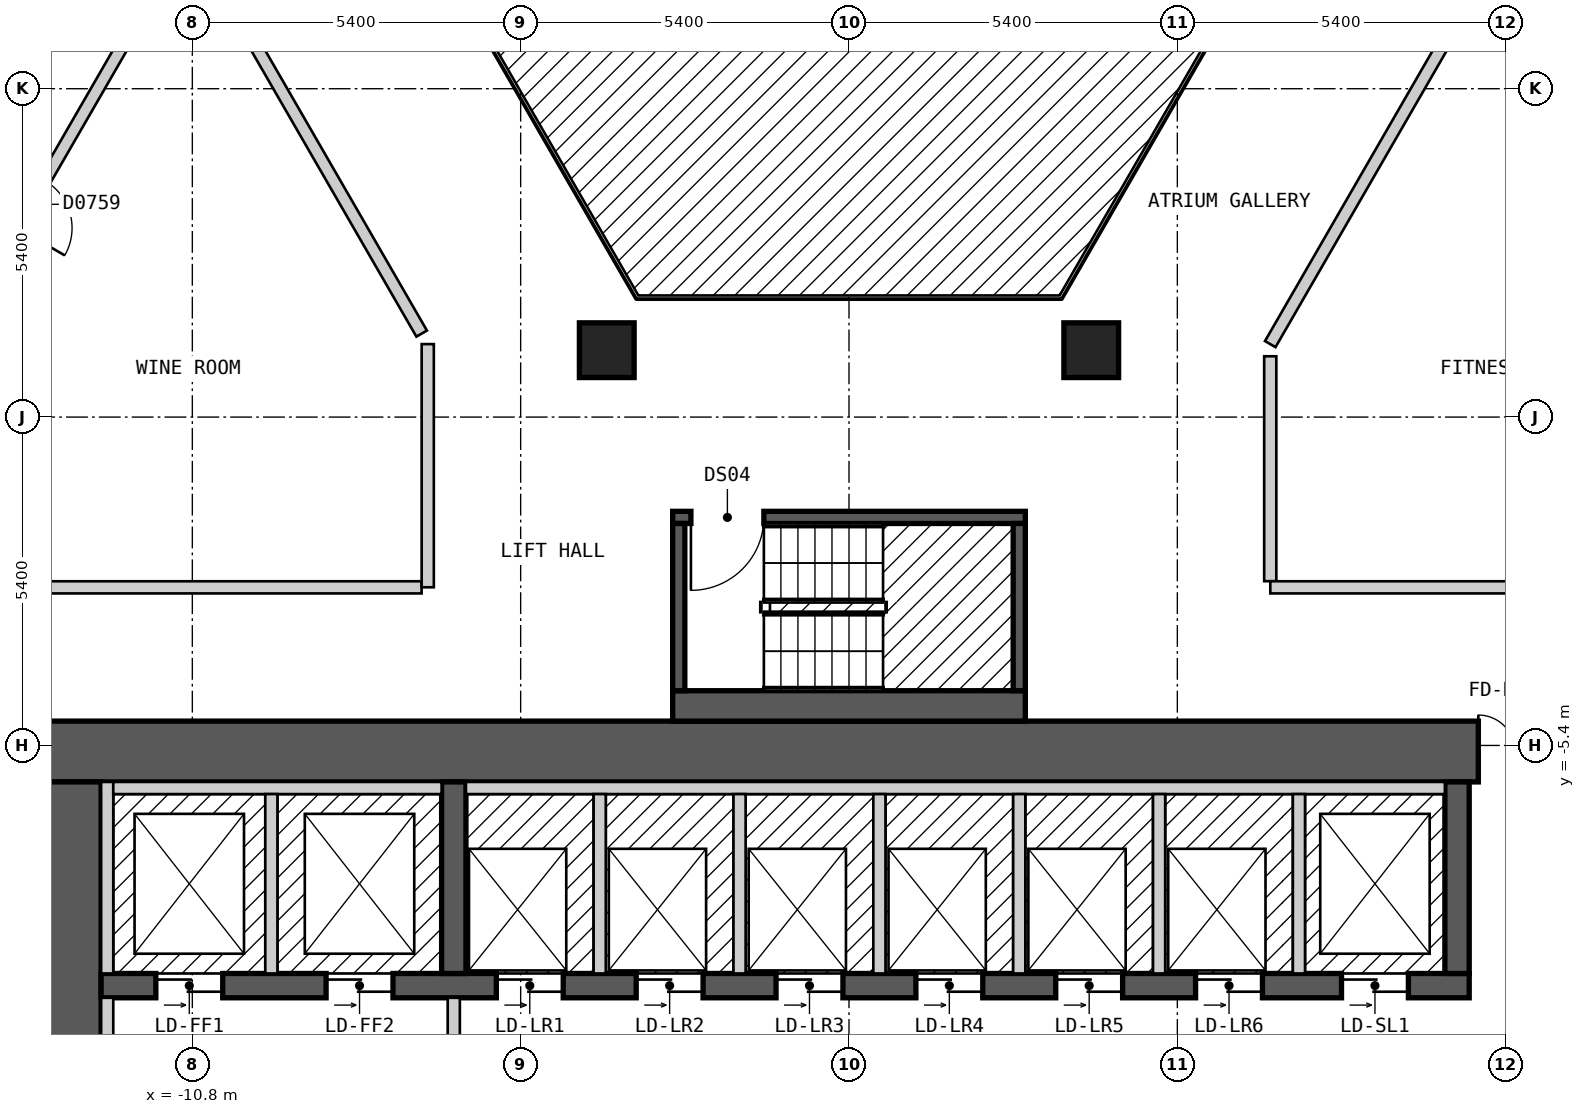
"""IFC4 building model, lengths in metres.
Left out: names, types, materials, properties, quantities, classifications, styles, units other than length and angle.
Written with IfcOpenShell. Run it as: python <this file> out.ifc"""

import sys

from ifc_helpers import new_model, si_unit, direction, frame, frame_2d, origin, origin_2d, place, context, subcontext, project, spatial, rectangle, extrude, element, fill, save


model = new_model("IFC4")
c1 = context("Model", 3, precision=1e-05, world=origin(), true_north=direction((0.0, 1.0)))
c2 = subcontext(c1, "Body", "Model", "MODEL_VIEW")
j1 = project(units=[si_unit("LENGTHUNIT", "METRE"), si_unit("PLANEANGLEUNIT", "RADIAN")], contexts=[c1])
p1 = place(None, origin())
s1 = spatial("IfcSite", under=j1, at=p1, CompositionType="ELEMENT")
p2 = place(p1, origin())
s2 = spatial("IfcBuilding", under=s1, at=p2, CompositionType="ELEMENT")
p3 = place(p2, frame((0.0, 0.0, 93.0)))
s3 = spatial("IfcBuildingStorey", under=s2, at=p3, CompositionType="ELEMENT", Elevation=93.0)
for number, where, z_axis, x_axis in (
    (1, (3.984, 1.1, 0.0), (0.0, 0.0, 1.0), (1.0, 0.0, 0.0)),
    (2, (-3.984, 1.1, 0.0), (0.0, 0.0, 1.0), (1.0, 0.0, 0.0)),
):
    element("IfcColumn", number, at=place(p3, frame(where, z_axis=z_axis, x_axis=x_axis)), inside=s3, PredefinedType="COLUMN", context=c2, shape_type="SweptSolid", body=[
        extrude(rectangle(XDim=0.9, YDim=0.9, at=origin_2d()), origin(), (0.0, 0.0, 1.0), 3.0),
    ])
p4 = place(p3, frame((-13.3, -5.5, 0.0), z_axis=(0.0, 0.0, 1.0), x_axis=(1.0, 0.0, 0.0)))
e3 = element("IfcWall", 3, at=p4, inside=s3, PredefinedType="SHEAR", context=c2, shape_type="SweptSolid", body=[
    extrude(rectangle(XDim=26.6, YDim=1.0, at=frame_2d((13.3, 0.0))), origin(), (0.0, 0.0, 1.0), 2.7),
])
p5 = place(p4, frame((23.65, 0.0, 0.0)))
e4 = element("IfcOpeningElement", 4, at=p5, cuts=e3, PredefinedType="OPENING", context=c2, shape_type="SweptSolid", body=[
    extrude(rectangle(XDim=1.2, YDim=2.1, at=frame_2d((0.6, 1.05))), frame((0.0, 0.51, 0.0), z_axis=(0.0, -1.0, 0.0), x_axis=(1.0, 0.0, 0.0)), (0.0, 0.0, 1.0), 1.02),
])
p6 = place(p3, frame((-12.8, -18.0, 0.0), z_axis=(0.0, 0.0, 1.0), x_axis=(0.0, 1.0, 0.0)))
e5 = element("IfcWall", 5, at=p6, inside=s3, PredefinedType="SHEAR", context=c2, shape_type="SweptSolid", body=[
    extrude(rectangle(XDim=12.0, YDim=1.0, at=frame_2d((6.0, 0.0))), origin(), (0.0, 0.0, 1.0), 2.7),
])
p7 = place(p6, frame((3.8, 0.0, 0.0)))
e6 = element("IfcOpeningElement", 6, at=p7, cuts=e5, PredefinedType="OPENING", context=c2, shape_type="SweptSolid", body=[
    extrude(rectangle(XDim=1.2, YDim=2.1, at=frame_2d((0.6, 1.05))), frame((0.0, 0.51, 0.0), z_axis=(0.0, -1.0, 0.0), x_axis=(1.0, 0.0, 0.0)), (0.0, 0.0, 1.0), 1.02),
])
p8 = place(p3, frame((-12.3, -9.35, 0.0), z_axis=(0.0, 0.0, 1.0), x_axis=(1.0, 0.0, 0.0)))
e7 = element("IfcWall", 7, at=p8, inside=s3, PredefinedType="SHEAR", context=c2, shape_type="SweptSolid", body=[
    extrude(rectangle(XDim=22.5, YDim=0.4, at=frame_2d((11.25, 0.0))), origin(), (0.0, 0.0, 1.0), 2.7),
])
p9 = place(p8, frame((0.9, 0.0, 0.0)))
e8 = element("IfcOpeningElement", 8, at=p9, cuts=e7, PredefinedType="OPENING", context=c2, shape_type="SweptSolid", body=[
    extrude(rectangle(XDim=1.1, YDim=2.1, at=frame_2d((0.55, 1.05))), frame((0.0, 0.21, 0.0), z_axis=(0.0, -1.0, 0.0), x_axis=(1.0, 0.0, 0.0)), (0.0, 0.0, 1.0), 0.42),
])
p10 = place(p8, frame((3.7, 0.0, 0.0)))
e9 = element("IfcOpeningElement", 9, at=p10, cuts=e7, PredefinedType="OPENING", context=c2, shape_type="SweptSolid", body=[
    extrude(rectangle(XDim=1.1, YDim=2.1, at=frame_2d((0.55, 1.05))), frame((0.0, 0.21, 0.0), z_axis=(0.0, -1.0, 0.0), x_axis=(1.0, 0.0, 0.0)), (0.0, 0.0, 1.0), 0.42),
])
p11 = place(p8, frame((6.5, 0.0, 0.0)))
e10 = element("IfcOpeningElement", 10, at=p11, cuts=e7, PredefinedType="OPENING", context=c2, shape_type="SweptSolid", body=[
    extrude(rectangle(XDim=1.1, YDim=2.1, at=frame_2d((0.55, 1.05))), frame((0.0, 0.21, 0.0), z_axis=(0.0, -1.0, 0.0), x_axis=(1.0, 0.0, 0.0)), (0.0, 0.0, 1.0), 0.42),
])
p12 = place(p8, frame((8.8, 0.0, 0.0)))
e11 = element("IfcOpeningElement", 11, at=p12, cuts=e7, PredefinedType="OPENING", context=c2, shape_type="SweptSolid", body=[
    extrude(rectangle(XDim=1.1, YDim=2.1, at=frame_2d((0.55, 1.05))), frame((0.0, 0.21, 0.0), z_axis=(0.0, -1.0, 0.0), x_axis=(1.0, 0.0, 0.0)), (0.0, 0.0, 1.0), 0.42),
])
p13 = place(p8, frame((11.1, 0.0, 0.0)))
e12 = element("IfcOpeningElement", 12, at=p13, cuts=e7, PredefinedType="OPENING", context=c2, shape_type="SweptSolid", body=[
    extrude(rectangle(XDim=1.1, YDim=2.1, at=frame_2d((0.55, 1.05))), frame((0.0, 0.21, 0.0), z_axis=(0.0, -1.0, 0.0), x_axis=(1.0, 0.0, 0.0)), (0.0, 0.0, 1.0), 0.42),
])
p14 = place(p8, frame((13.4, 0.0, 0.0)))
e13 = element("IfcOpeningElement", 13, at=p14, cuts=e7, PredefinedType="OPENING", context=c2, shape_type="SweptSolid", body=[
    extrude(rectangle(XDim=1.1, YDim=2.1, at=frame_2d((0.55, 1.05))), frame((0.0, 0.21, 0.0), z_axis=(0.0, -1.0, 0.0), x_axis=(1.0, 0.0, 0.0)), (0.0, 0.0, 1.0), 0.42),
])
p15 = place(p8, frame((15.7, 0.0, 0.0)))
e14 = element("IfcOpeningElement", 14, at=p15, cuts=e7, PredefinedType="OPENING", context=c2, shape_type="SweptSolid", body=[
    extrude(rectangle(XDim=1.1, YDim=2.1, at=frame_2d((0.55, 1.05))), frame((0.0, 0.21, 0.0), z_axis=(0.0, -1.0, 0.0), x_axis=(1.0, 0.0, 0.0)), (0.0, 0.0, 1.0), 0.42),
])
p16 = place(p8, frame((18.0, 0.0, 0.0)))
e15 = element("IfcOpeningElement", 15, at=p16, cuts=e7, PredefinedType="OPENING", context=c2, shape_type="SweptSolid", body=[
    extrude(rectangle(XDim=1.1, YDim=2.1, at=frame_2d((0.55, 1.05))), frame((0.0, 0.21, 0.0), z_axis=(0.0, -1.0, 0.0), x_axis=(1.0, 0.0, 0.0)), (0.0, 0.0, 1.0), 0.42),
])
p17 = place(p8, frame((20.4, 0.0, 0.0)))
e16 = element("IfcOpeningElement", 16, at=p17, cuts=e7, PredefinedType="OPENING", context=c2, shape_type="SweptSolid", body=[
    extrude(rectangle(XDim=1.1, YDim=2.1, at=frame_2d((0.55, 1.05))), frame((0.0, 0.21, 0.0), z_axis=(0.0, -1.0, 0.0), x_axis=(1.0, 0.0, 0.0)), (0.0, 0.0, 1.0), 0.42),
])
for number, where, z_axis, x_axis in (
    (17, (-6.5, -9.15, 0.0), (0.0, 0.0, 1.0), (0.0, 1.0, 0.0)),
    (18, (10.0, -9.15, 0.0), (0.0, 0.0, 1.0), (0.0, 1.0, 0.0)),
):
    element("IfcWall", number, at=place(p3, frame(where, z_axis=z_axis, x_axis=x_axis)), inside=s3, PredefinedType="SHEAR", context=c2, shape_type="SweptSolid", body=[
        extrude(rectangle(XDim=3.15, YDim=0.4, at=frame_2d((1.575, 0.0))), origin(), (0.0, 0.0, 1.0), 2.7),
    ])
p18 = place(p3, frame((-2.9, -4.75, 0.0), z_axis=(0.0, 0.0, 1.0), x_axis=(1.0, 0.0, 0.0)))
e19 = element("IfcWall", 19, at=p18, inside=s3, PredefinedType="SOLIDWALL", context=c2, shape_type="SweptSolid", body=[
    extrude(rectangle(XDim=5.8, YDim=0.5, at=frame_2d((2.9, 0.0))), origin(), (0.0, 0.0, 1.0), 2.7),
])
p19 = place(p3, frame((-2.9, -1.65, 0.0), z_axis=(0.0, 0.0, 1.0), x_axis=(1.0, 0.0, 0.0)))
e20 = element("IfcWall", 20, at=p19, inside=s3, PredefinedType="SOLIDWALL", context=c2, shape_type="SweptSolid", body=[
    extrude(rectangle(XDim=5.8, YDim=0.2, at=frame_2d((2.9, 0.0))), origin(), (0.0, 0.0, 1.0), 2.7),
])
p20 = place(p19, frame((0.3, 0.0, 0.0)))
e21 = element("IfcOpeningElement", 21, at=p20, cuts=e20, PredefinedType="OPENING", context=c2, shape_type="SweptSolid", body=[
    extrude(rectangle(XDim=1.2, YDim=2.1, at=frame_2d((0.6, 1.05))), frame((0.0, 0.11, 0.0), z_axis=(0.0, -1.0, 0.0), x_axis=(1.0, 0.0, 0.0)), (0.0, 0.0, 1.0), 0.22),
])
for number, where, z_axis, x_axis in (
    (22, (-2.8, -4.5, 0.0), (0.0, 0.0, 1.0), (0.0, 1.0, 0.0)),
    (23, (2.8, -4.5, 0.0), (0.0, 0.0, 1.0), (0.0, 1.0, 0.0)),
):
    element("IfcWall", number, at=place(p3, frame(where, z_axis=z_axis, x_axis=x_axis)), inside=s3, PredefinedType="SOLIDWALL", context=c2, shape_type="SweptSolid", body=[
        extrude(rectangle(XDim=2.75, YDim=0.2, at=frame_2d((1.375, 0.0))), origin(), (0.0, 0.0, 1.0), 2.7),
    ])
p21 = place(p3, frame((-10.796, 7.899, 0.0), z_axis=(0.0, 0.0, 1.0), x_axis=(0.500010383074, -0.866019409031, 0.0)))
e24 = element("IfcWall", 24, at=p21, inside=s3, PredefinedType="PARTITIONING", context=c2, shape_type="SweptSolid", body=[
    extrude(rectangle(XDim=7.535, YDim=0.2, at=frame_2d((3.768, 0.0))), origin(), (0.0, 0.0, 1.0), 2.7),
])
p22 = place(p3, frame((8.488, 16.5, 0.0), z_axis=(0.0, 0.0, 1.0), x_axis=(0.499986836607, -0.86603300354, 0.0)))
e25 = element("IfcWall", 25, at=p22, inside=s3, PredefinedType="PARTITIONING", context=c2, shape_type="SweptSolid", body=[
    extrude(rectangle(XDim=20.09, YDim=0.2, at=frame_2d((10.045, 0.0))), origin(), (0.0, 0.0, 1.0), 2.7),
])
p23 = place(p22, frame((14.569, 0.0, 0.0)))
e26 = element("IfcOpeningElement", 26, at=p23, cuts=e25, PredefinedType="OPENING", context=c2, shape_type="SweptSolid", body=[
    extrude(rectangle(XDim=1.0, YDim=2.1, at=frame_2d((0.5, 1.05))), frame((0.0, 0.11, 0.0), z_axis=(0.0, -1.0, 0.0), x_axis=(1.0, 0.0, 0.0)), (0.0, 0.0, 1.0), 0.22),
])
p24 = place(p22, frame((4.547, 0.0, 0.0)))
e27 = element("IfcOpeningElement", 27, at=p24, cuts=e25, PredefinedType="OPENING", context=c2, shape_type="SweptSolid", body=[
    extrude(rectangle(XDim=1.0, YDim=2.1, at=frame_2d((0.5, 1.05))), frame((0.0, 0.11, 0.0), z_axis=(0.0, -1.0, 0.0), x_axis=(1.0, 0.0, 0.0)), (0.0, 0.0, 1.0), 0.22),
])
p25 = place(p3, frame((6.928, 1.0, 0.0), z_axis=(0.0, 0.0, 1.0), x_axis=(0.0, -1.0, 0.0)))
e28 = element("IfcWall", 28, at=p25, inside=s3, PredefinedType="PARTITIONING", context=c2, shape_type="SweptSolid", body=[
    extrude(rectangle(XDim=3.699, YDim=0.2, at=frame_2d((1.85, 0.0))), origin(), (0.0, 0.0, 1.0), 2.7),
])
p26 = place(p3, frame((-15.011, -2.8, 0.0), z_axis=(0.0, 0.0, 1.0), x_axis=(1.0, 0.0, 0.0)))
e29 = element("IfcWall", 29, at=p26, inside=s3, PredefinedType="PARTITIONING", context=c2, shape_type="SweptSolid", body=[
    extrude(rectangle(XDim=7.982, YDim=0.2, at=frame_2d((3.991, 0.0))), origin(), (0.0, 0.0, 1.0), 2.7),
])
p27 = place(p3, frame((6.929, -2.8, 0.0), z_axis=(0.0, 0.0, 1.0), x_axis=(1.0, 0.0, 0.0)))
e30 = element("IfcWall", 30, at=p27, inside=s3, PredefinedType="PARTITIONING", context=c2, shape_type="SweptSolid", body=[
    extrude(rectangle(XDim=7.966, YDim=0.2, at=frame_2d((3.983, 0.0))), origin(), (0.0, 0.0, 1.0), 2.7),
])
p28 = place(p3, frame((6.928, 1.2, 0.0), z_axis=(0.0, 0.0, 1.0), x_axis=(0.500055327065, 0.865993458332, 0.0)))
e31 = element("IfcWall", 31, at=p28, inside=s3, PredefinedType="PARTITIONING", context=c2, shape_type="SweptSolid", body=[
    extrude(rectangle(XDim=7.851, YDim=0.2, at=frame_2d((3.926, 0.0))), origin(), (0.0, 0.0, 1.0), 2.7),
])
p29 = place(p3, frame((-16.05, -1.0, 0.0), z_axis=(0.0, 0.0, 1.0), x_axis=(0.499962449088, 0.866047082728, 0.0)))
e32 = element("IfcWall", 32, at=p29, inside=s3, PredefinedType="PARTITIONING", context=c2, shape_type="SweptSolid", body=[
    extrude(rectangle(XDim=10.391, YDim=0.2, at=frame_2d((5.195, 0.0))), origin(), (0.0, 0.0, 1.0), 2.7),
])
p30 = place(p29, frame((4.745, 0.0, 0.0)))
e33 = element("IfcOpeningElement", 33, at=p30, cuts=e32, PredefinedType="OPENING", context=c2, shape_type="SweptSolid", body=[
    extrude(rectangle(XDim=0.9, YDim=2.1, at=frame_2d((0.45, 1.05))), frame((0.0, 0.11, 0.0), z_axis=(0.0, -1.0, 0.0), x_axis=(1.0, 0.0, 0.0)), (0.0, 0.0, 1.0), 0.22),
])
p31 = place(p3, frame((-18.533, -0.901, 0.0), z_axis=(0.0, 0.0, 1.0), x_axis=(0.499981198768, 0.866036258409, 0.0)))
e34 = element("IfcWall", 34, at=p31, inside=s3, PredefinedType="PARTITIONING", context=c2, shape_type="SweptSolid", body=[
    extrude(rectangle(XDim=20.093, YDim=0.2, at=frame_2d((10.046, 0.0))), origin(), (0.0, 0.0, 1.0), 2.7),
])
p32 = place(p31, frame((14.57, 0.0, 0.0)))
e35 = element("IfcOpeningElement", 35, at=p32, cuts=e34, PredefinedType="OPENING", context=c2, shape_type="SweptSolid", body=[
    extrude(rectangle(XDim=1.0, YDim=2.1, at=frame_2d((0.5, 1.05))), frame((0.0, 0.11, 0.0), z_axis=(0.0, -1.0, 0.0), x_axis=(1.0, 0.0, 0.0)), (0.0, 0.0, 1.0), 0.22),
])
p33 = place(p31, frame((4.523, 0.0, 0.0)))
e36 = element("IfcOpeningElement", 36, at=p33, cuts=e34, PredefinedType="OPENING", context=c2, shape_type="SweptSolid", body=[
    extrude(rectangle(XDim=1.0, YDim=2.1, at=frame_2d((0.5, 1.05))), frame((0.0, 0.11, 0.0), z_axis=(0.0, -1.0, 0.0), x_axis=(1.0, 0.0, 0.0)), (0.0, 0.0, 1.0), 0.22),
])
p34 = place(p3, frame((-6.928, -2.799, 0.0), z_axis=(0.0, 0.0, 1.0), x_axis=(0.0, 1.0, 0.0)))
e37 = element("IfcWall", 37, at=p34, inside=s3, PredefinedType="PARTITIONING", context=c2, shape_type="SweptSolid", body=[
    extrude(rectangle(XDim=3.999, YDim=0.2, at=frame_2d((2.0, 0.0))), origin(), (0.0, 0.0, 1.0), 2.7),
])
p35 = place(p3, frame((-12.2, -13.0, 0.0), z_axis=(0.0, 0.0, 1.0), x_axis=(0.0, 1.0, 0.0)))
e38 = element("IfcWall", 38, at=p35, inside=s3, PredefinedType="PARTITIONING", context=c2, shape_type="SweptSolid", body=[
    extrude(rectangle(XDim=3.45, YDim=0.2, at=frame_2d((1.725, 0.0))), origin(), (0.0, 0.0, 1.0), 2.7),
])
p36 = place(p3, frame((-12.2, -9.15, 0.0), z_axis=(0.0, 0.0, 1.0), x_axis=(0.0, 1.0, 0.0)))
e39 = element("IfcWall", 39, at=p36, inside=s3, PredefinedType="SOLIDWALL", context=c2, shape_type="SweptSolid", body=[
    extrude(rectangle(XDim=3.15, YDim=0.2, at=frame_2d((1.575, 0.0))), origin(), (0.0, 0.0, 1.0), 2.7),
])
p37 = place(p3, frame((-12.1, -6.1, 0.0), z_axis=(0.0, 0.0, 1.0), x_axis=(1.0, 0.0, 0.0)))
e40 = element("IfcWall", 40, at=p37, inside=s3, PredefinedType="SOLIDWALL", context=c2, shape_type="SweptSolid", body=[
    extrude(rectangle(XDim=5.4, YDim=0.2, at=frame_2d((2.7, 0.0))), origin(), (0.0, 0.0, 1.0), 2.7),
])
p38 = place(p3, frame((-9.5, -9.15, 0.0), z_axis=(0.0, 0.0, 1.0), x_axis=(0.0, 1.0, 0.0)))
e41 = element("IfcWall", 41, at=p38, inside=s3, PredefinedType="SOLIDWALL", context=c2, shape_type="SweptSolid", body=[
    extrude(rectangle(XDim=2.95, YDim=0.2, at=frame_2d((1.475, 0.0))), origin(), (0.0, 0.0, 1.0), 2.7),
])
p39 = place(p3, frame((-6.5, -14.45, 0.0), z_axis=(0.0, 0.0, 1.0), x_axis=(0.0, 1.0, 0.0)))
e42 = element("IfcWall", 42, at=p39, inside=s3, PredefinedType="PARTITIONING", context=c2, shape_type="SweptSolid", body=[
    extrude(rectangle(XDim=4.9, YDim=0.2, at=frame_2d((2.45, 0.0))), origin(), (0.0, 0.0, 1.0), 2.7),
])
p40 = place(p39, frame((3.15, 0.0, 0.0), z_axis=(0.0, 0.0, 1.0), x_axis=(-1.0, 0.0, 0.0)))
e43 = element("IfcOpeningElement", 43, at=p40, cuts=e42, PredefinedType="OPENING", context=c2, shape_type="SweptSolid", body=[
    extrude(rectangle(XDim=1.4, YDim=2.1, at=frame_2d((0.7, 1.05))), frame((0.0, 0.11, 0.0), z_axis=(0.0, -1.0, 0.0), x_axis=(1.0, 0.0, 0.0)), (0.0, 0.0, 1.0), 0.22),
])
p41 = place(p3, frame((-6.3, -6.1, 0.0), z_axis=(0.0, 0.0, 1.0), x_axis=(1.0, 0.0, 0.0)))
e44 = element("IfcWall", 44, at=p41, inside=s3, PredefinedType="SOLIDWALL", context=c2, shape_type="SweptSolid", body=[
    extrude(rectangle(XDim=16.1, YDim=0.2, at=frame_2d((8.05, 0.0))), origin(), (0.0, 0.0, 1.0), 2.7),
])
for number, where, z_axis, x_axis in (
    (45, (-4.1, -9.15, 0.0), (0.0, 0.0, 1.0), (0.0, 1.0, 0.0)),
    (46, (-1.8, -9.15, 0.0), (0.0, 0.0, 1.0), (0.0, 1.0, 0.0)),
    (47, (0.5, -9.15, 0.0), (0.0, 0.0, 1.0), (0.0, 1.0, 0.0)),
    (48, (2.8, -9.15, 0.0), (0.0, 0.0, 1.0), (0.0, 1.0, 0.0)),
    (49, (5.1, -9.15, 0.0), (0.0, 0.0, 1.0), (0.0, 1.0, 0.0)),
    (50, (7.4, -9.15, 0.0), (0.0, 0.0, 1.0), (0.0, 1.0, 0.0)),
):
    element("IfcWall", number, at=place(p3, frame(where, z_axis=z_axis, x_axis=x_axis)), inside=s3, PredefinedType="SOLIDWALL", context=c2, shape_type="SweptSolid", body=[
        extrude(rectangle(XDim=2.95, YDim=0.2, at=frame_2d((1.475, 0.0))), origin(), (0.0, 0.0, 1.0), 2.7),
    ])
p42 = place(p20, origin())
e51 = element("IfcDoor", 51, at=p42, inside=s3, OperationType="SINGLE_SWING_LEFT", PredefinedType="DOOR", context=c2, shape_type="SweptSolid", body=[
    extrude(rectangle(XDim=1.2, YDim=2.1, at=frame_2d((0.6, 1.05))), frame((0.0, 0.025, 0.0), z_axis=(0.0, -1.0, 0.0), x_axis=(1.0, 0.0, 0.0)), (0.0, 0.0, 1.0), 0.05),
])
fill(e21, e51)
p43 = place(p9, origin())
e52 = element("IfcDoor", 52, at=p43, inside=s3, OperationType="DOUBLE_DOOR_SLIDING", PredefinedType="DOOR", context=c2, shape_type="SweptSolid", body=[
    extrude(rectangle(XDim=1.1, YDim=2.1, at=frame_2d((0.55, 1.05))), frame((0.0, 0.025, 0.0), z_axis=(0.0, -1.0, 0.0), x_axis=(1.0, 0.0, 0.0)), (0.0, 0.0, 1.0), 0.05),
])
fill(e8, e52)
p44 = place(p10, origin())
e53 = element("IfcDoor", 53, at=p44, inside=s3, OperationType="DOUBLE_DOOR_SLIDING", PredefinedType="DOOR", context=c2, shape_type="SweptSolid", body=[
    extrude(rectangle(XDim=1.1, YDim=2.1, at=frame_2d((0.55, 1.05))), frame((0.0, 0.025, 0.0), z_axis=(0.0, -1.0, 0.0), x_axis=(1.0, 0.0, 0.0)), (0.0, 0.0, 1.0), 0.05),
])
fill(e9, e53)
p45 = place(p11, origin())
e54 = element("IfcDoor", 54, at=p45, inside=s3, OperationType="DOUBLE_DOOR_SLIDING", PredefinedType="DOOR", context=c2, shape_type="SweptSolid", body=[
    extrude(rectangle(XDim=1.1, YDim=2.1, at=frame_2d((0.55, 1.05))), frame((0.0, 0.025, 0.0), z_axis=(0.0, -1.0, 0.0), x_axis=(1.0, 0.0, 0.0)), (0.0, 0.0, 1.0), 0.05),
])
fill(e10, e54)
p46 = place(p12, origin())
e55 = element("IfcDoor", 55, at=p46, inside=s3, OperationType="DOUBLE_DOOR_SLIDING", PredefinedType="DOOR", context=c2, shape_type="SweptSolid", body=[
    extrude(rectangle(XDim=1.1, YDim=2.1, at=frame_2d((0.55, 1.05))), frame((0.0, 0.025, 0.0), z_axis=(0.0, -1.0, 0.0), x_axis=(1.0, 0.0, 0.0)), (0.0, 0.0, 1.0), 0.05),
])
fill(e11, e55)
p47 = place(p13, origin())
e56 = element("IfcDoor", 56, at=p47, inside=s3, OperationType="DOUBLE_DOOR_SLIDING", PredefinedType="DOOR", context=c2, shape_type="SweptSolid", body=[
    extrude(rectangle(XDim=1.1, YDim=2.1, at=frame_2d((0.55, 1.05))), frame((0.0, 0.025, 0.0), z_axis=(0.0, -1.0, 0.0), x_axis=(1.0, 0.0, 0.0)), (0.0, 0.0, 1.0), 0.05),
])
fill(e12, e56)
p48 = place(p14, origin())
e57 = element("IfcDoor", 57, at=p48, inside=s3, OperationType="DOUBLE_DOOR_SLIDING", PredefinedType="DOOR", context=c2, shape_type="SweptSolid", body=[
    extrude(rectangle(XDim=1.1, YDim=2.1, at=frame_2d((0.55, 1.05))), frame((0.0, 0.025, 0.0), z_axis=(0.0, -1.0, 0.0), x_axis=(1.0, 0.0, 0.0)), (0.0, 0.0, 1.0), 0.05),
])
fill(e13, e57)
p49 = place(p15, origin())
e58 = element("IfcDoor", 58, at=p49, inside=s3, OperationType="DOUBLE_DOOR_SLIDING", PredefinedType="DOOR", context=c2, shape_type="SweptSolid", body=[
    extrude(rectangle(XDim=1.1, YDim=2.1, at=frame_2d((0.55, 1.05))), frame((0.0, 0.025, 0.0), z_axis=(0.0, -1.0, 0.0), x_axis=(1.0, 0.0, 0.0)), (0.0, 0.0, 1.0), 0.05),
])
fill(e14, e58)
p50 = place(p16, origin())
e59 = element("IfcDoor", 59, at=p50, inside=s3, OperationType="DOUBLE_DOOR_SLIDING", PredefinedType="DOOR", context=c2, shape_type="SweptSolid", body=[
    extrude(rectangle(XDim=1.1, YDim=2.1, at=frame_2d((0.55, 1.05))), frame((0.0, 0.025, 0.0), z_axis=(0.0, -1.0, 0.0), x_axis=(1.0, 0.0, 0.0)), (0.0, 0.0, 1.0), 0.05),
])
fill(e15, e59)
p51 = place(p17, origin())
e60 = element("IfcDoor", 60, at=p51, inside=s3, OperationType="DOUBLE_DOOR_SLIDING", PredefinedType="DOOR", context=c2, shape_type="SweptSolid", body=[
    extrude(rectangle(XDim=1.1, YDim=2.1, at=frame_2d((0.55, 1.05))), frame((0.0, 0.025, 0.0), z_axis=(0.0, -1.0, 0.0), x_axis=(1.0, 0.0, 0.0)), (0.0, 0.0, 1.0), 0.05),
])
fill(e16, e60)
p52 = place(p5, origin())
e61 = element("IfcDoor", 61, at=p52, inside=s3, OperationType="DOUBLE_DOOR_SINGLE_SWING", PredefinedType="DOOR", context=c2, shape_type="SweptSolid", body=[
    extrude(rectangle(XDim=1.2, YDim=2.1, at=frame_2d((0.6, 1.05))), frame((0.0, 0.025, 0.0), z_axis=(0.0, -1.0, 0.0), x_axis=(1.0, 0.0, 0.0)), (0.0, 0.0, 1.0), 0.05),
])
fill(e4, e61)
save(model, sys.argv[1])
